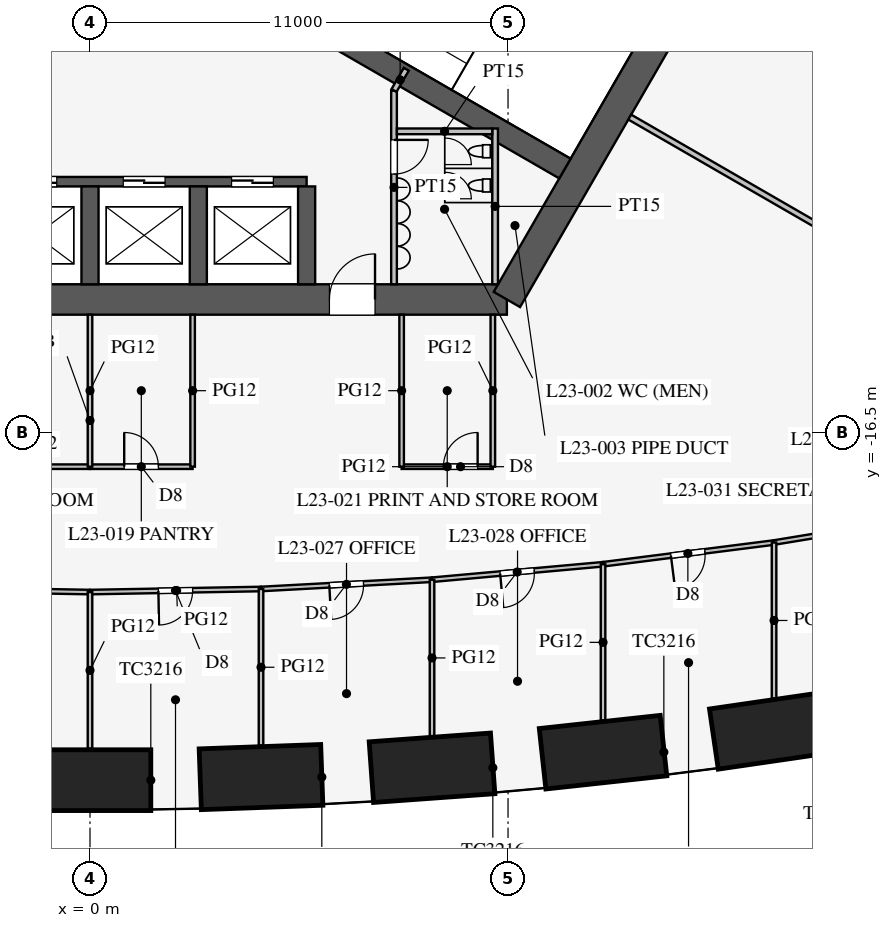
"""IFC4 building model, lengths in metres.
Left out: names, types, materials, properties, quantities, classifications, styles, units other than length and angle.
Written with IfcOpenShell. Run it as: python <this file> out.ifc"""

import sys

from ifc_helpers import new_model, si_unit, direction, frame, frame_2d, origin, origin_2d, place, context, subcontext, project, spatial, rectangle, extrude, element, fill, save


model = new_model("IFC4")
c1 = context("Model", 3, precision=1e-05, world=origin(), true_north=direction((0.0, 1.0)))
c2 = subcontext(c1, "Body", "Model", "MODEL_VIEW")
j1 = project(units=[si_unit("LENGTHUNIT", "METRE"), si_unit("PLANEANGLEUNIT", "RADIAN")], contexts=[c1])
p1 = place(None, origin())
s1 = spatial("IfcSite", under=j1, at=p1, CompositionType="ELEMENT")
p2 = place(p1, origin())
s2 = spatial("IfcBuilding", under=s1, at=p2, CompositionType="ELEMENT")
p3 = place(p2, frame((0.0, 0.0, 103.1)))
s3 = spatial("IfcBuildingStorey", under=s2, at=p3, CompositionType="ELEMENT", Elevation=103.1)
for number, where, z_axis, x_axis in (
    (1, (0.0, -25.65, 0.0), (0.0, 0.0, 1.0), (1.0, 0.0, 0.0)),
    (2, (4.5, -25.568, 0.0), (0.0, 0.0, 1.0), (0.999, 0.036, 0.0)),
    (3, (9.0, -25.323, 0.0), (0.0, 0.0, 1.0), (0.997, 0.072, 0.0)),
    (4, (13.5, -24.913, 0.0), (0.0, 0.0, 1.0), (0.994, 0.108, 0.0)),
    (5, (18.0, -24.337, 0.0), (0.0, 0.0, 1.0), (0.99, 0.144, 0.0)),
):
    element("IfcColumn", number, at=place(p3, frame(where, z_axis=z_axis, x_axis=x_axis)), inside=s3, PredefinedType="COLUMN", context=c2, shape_type="SweptSolid", body=[
        extrude(rectangle(XDim=3.2, YDim=1.6, at=origin_2d()), origin(), (0.0, 0.0, 1.0), 4.2),
    ])
p4 = place(p3, frame((-10.97, -13.0, 0.0), z_axis=(0.0, 0.0, 1.0), x_axis=(1.0, 0.0, 0.0)))
e6 = element("IfcWall", 6, at=p4, inside=s3, PredefinedType="SHEAR", context=c2, shape_type="SweptSolid", body=[
    extrude(rectangle(XDim=21.939, YDim=0.8, at=frame_2d((10.97, 0.0))), origin(), (0.0, 0.0, 1.0), 4.2),
])
p5 = place(p4, frame((17.27, 0.0, 0.0)))
e7 = element("IfcOpeningElement", 7, at=p5, cuts=e6, PredefinedType="OPENING", context=c2, shape_type="SweptSolid", body=[
    extrude(rectangle(XDim=1.2, YDim=2.1, at=frame_2d((0.6, 1.05))), frame((0.0, 0.41, 0.0), z_axis=(0.0, -1.0, 0.0), x_axis=(1.0, 0.0, 0.0)), (0.0, 0.0, 1.0), 0.82),
])
p6 = place(p4, frame((3.47, 0.0, 0.0)))
e8 = element("IfcOpeningElement", 8, at=p6, cuts=e6, PredefinedType="OPENING", context=c2, shape_type="SweptSolid", body=[
    extrude(rectangle(XDim=1.2, YDim=2.1, at=frame_2d((0.6, 1.05))), frame((0.0, 0.41, 0.0), z_axis=(0.0, -1.0, 0.0), x_axis=(1.0, 0.0, 0.0)), (0.0, 0.0, 1.0), 0.82),
])
p7 = place(p3, frame((10.97, -13.0, 0.0), z_axis=(0.0, 0.0, 1.0), x_axis=(0.499995765644, 0.866027848477, 0.0)))
e9 = element("IfcWall", 9, at=p7, inside=s3, PredefinedType="SHEAR", context=c2, shape_type="SweptSolid", body=[
    extrude(rectangle(XDim=11.547, YDim=0.8, at=frame_2d((5.773, 0.0))), origin(), (0.0, 0.0, 1.0), 4.2),
])
p8 = place(p3, frame((-5.7, -9.9, 0.0), z_axis=(0.0, 0.0, 1.0), x_axis=(1.0, 0.0, 0.0)))
e10 = element("IfcWall", 10, at=p8, inside=s3, PredefinedType="SHEAR", context=c2, shape_type="SweptSolid", body=[
    extrude(rectangle(XDim=11.4, YDim=0.25, at=frame_2d((5.7, 0.0))), origin(), (0.0, 0.0, 1.0), 4.2),
])
p9 = place(p8, frame((0.875, 0.0, 0.0)))
e11 = element("IfcOpeningElement", 11, at=p9, cuts=e10, PredefinedType="OPENING", context=c2, shape_type="SweptSolid", body=[
    extrude(rectangle(XDim=1.1, YDim=2.2, at=frame_2d((0.55, 1.1))), frame((0.0, 0.135, 0.0), z_axis=(0.0, -1.0, 0.0), x_axis=(1.0, 0.0, 0.0)), (0.0, 0.0, 1.0), 0.27),
])
p10 = place(p8, frame((3.725, 0.0, 0.0)))
e12 = element("IfcOpeningElement", 12, at=p10, cuts=e10, PredefinedType="OPENING", context=c2, shape_type="SweptSolid", body=[
    extrude(rectangle(XDim=1.1, YDim=2.2, at=frame_2d((0.55, 1.1))), frame((0.0, 0.135, 0.0), z_axis=(0.0, -1.0, 0.0), x_axis=(1.0, 0.0, 0.0)), (0.0, 0.0, 1.0), 0.27),
])
p11 = place(p8, frame((6.575, 0.0, 0.0)))
e13 = element("IfcOpeningElement", 13, at=p11, cuts=e10, PredefinedType="OPENING", context=c2, shape_type="SweptSolid", body=[
    extrude(rectangle(XDim=1.1, YDim=2.2, at=frame_2d((0.55, 1.1))), frame((0.0, 0.135, 0.0), z_axis=(0.0, -1.0, 0.0), x_axis=(1.0, 0.0, 0.0)), (0.0, 0.0, 1.0), 0.27),
])
p12 = place(p8, frame((9.425, 0.0, 0.0)))
e14 = element("IfcOpeningElement", 14, at=p12, cuts=e10, PredefinedType="OPENING", context=c2, shape_type="SweptSolid", body=[
    extrude(rectangle(XDim=1.1, YDim=2.2, at=frame_2d((0.55, 1.1))), frame((0.0, 0.135, 0.0), z_axis=(0.0, -1.0, 0.0), x_axis=(1.0, 0.0, 0.0)), (0.0, 0.0, 1.0), 0.27),
])
for number, where, z_axis, x_axis in (
    (15, (0.0, -10.025, 0.0), (0.0, 0.0, 1.0), (0.0, -1.0, 0.0)),
    (16, (2.85, -10.025, 0.0), (0.0, 0.0, 1.0), (0.0, -1.0, 0.0)),
    (17, (5.7, -10.025, 0.0), (0.0, 0.0, 1.0), (0.0, -1.0, 0.0)),
):
    element("IfcWall", number, at=place(p3, frame(where, z_axis=z_axis, x_axis=x_axis)), inside=s3, PredefinedType="SHEAR", context=c2, shape_type="SweptSolid", body=[
        extrude(rectangle(XDim=2.575, YDim=0.45, at=frame_2d((1.288, 0.0))), origin(), (0.0, 0.0, 1.0), 4.2),
    ])
p13 = place(p3, frame((4.638, -5.016, 0.0), z_axis=(0.0, 0.0, 1.0), x_axis=(0.866019375473, -0.500010441196, 0.0)))
e18 = element("IfcWall", 18, at=p13, inside=s3, PredefinedType="SHEAR", context=c2, shape_type="SweptSolid", body=[
    extrude(rectangle(XDim=9.075, YDim=0.6, at=frame_2d((4.538, 0.0))), origin(), (0.0, 0.0, 1.0), 4.2),
])
p14 = place(p3, frame((8.0, -7.5, 0.0), z_axis=(0.0, 0.0, 1.0), x_axis=(0.0, -1.0, 0.0)))
e19 = element("IfcWall", 19, at=p14, inside=s3, PredefinedType="PARTITIONING", context=c2, shape_type="SweptSolid", body=[
    extrude(rectangle(XDim=5.1, YDim=0.15, at=frame_2d((2.55, 0.0))), origin(), (0.0, 0.0, 1.0), 4.0),
])
p15 = place(p14, frame((1.3, 0.0, 0.0)))
e20 = element("IfcOpeningElement", 20, at=p15, cuts=e19, PredefinedType="OPENING", context=c2, shape_type="SweptSolid", body=[
    extrude(rectangle(XDim=0.9, YDim=2.1, at=frame_2d((0.45, 1.05))), frame((0.0, 0.085, 0.0), z_axis=(0.0, -1.0, 0.0), x_axis=(1.0, 0.0, 0.0)), (0.0, 0.0, 1.0), 0.17),
])
p16 = place(p3, frame((8.0, -7.5, 0.0), z_axis=(0.0, 0.0, 1.0), x_axis=(0.499842556608, 0.866116284689, 0.0)))
e21 = element("IfcWall", 21, at=p16, inside=s3, PredefinedType="PARTITIONING", context=c2, shape_type="SweptSolid", body=[
    extrude(rectangle(XDim=0.645, YDim=0.15, at=frame_2d((0.323, 0.0))), origin(), (0.0, 0.0, 1.0), 4.0),
])
p17 = place(p3, frame((10.66, -8.5, 0.0), z_axis=(0.0, 0.0, 1.0), x_axis=(0.0, -1.0, 0.0)))
e22 = element("IfcWall", 22, at=p17, inside=s3, PredefinedType="PARTITIONING", context=c2, shape_type="SweptSolid", body=[
    extrude(rectangle(XDim=4.1, YDim=0.15, at=frame_2d((2.05, 0.0))), origin(), (0.0, 0.0, 1.0), 4.0),
])
p18 = place(p3, frame((8.075, -8.575, 0.0), z_axis=(0.0, 0.0, 1.0), x_axis=(1.0, 0.0, 0.0)))
e23 = element("IfcWall", 23, at=p18, inside=s3, PredefinedType="PARTITIONING", context=c2, shape_type="SweptSolid", body=[
    extrude(rectangle(XDim=2.51, YDim=0.15, at=frame_2d((1.255, 0.0))), origin(), (0.0, 0.0, 1.0), 4.0),
])
p19 = place(p3, frame((14.203, -8.2, 0.0), z_axis=(0.0, 0.0, 1.0), x_axis=(0.866024668836, -0.500001272966, 0.0)))
e24 = element("IfcWall", 24, at=p19, inside=s3, PredefinedType="PARTITIONING", context=c2, shape_type="SweptSolid", body=[
    extrude(rectangle(XDim=16.65, YDim=0.15, at=frame_2d((8.325, 0.0))), origin(), (0.0, 0.0, 1.0), 2.3),
])
p20 = place(p3, frame((8.2, -17.4, 0.0), z_axis=(0.0, 0.0, 1.0), x_axis=(1.0, 0.0, 0.0)))
e25 = element("IfcWall", 25, at=p20, inside=s3, PredefinedType="PARTITIONING", context=c2, shape_type="SweptSolid", body=[
    extrude(rectangle(XDim=2.4, YDim=0.12, at=frame_2d((1.2, 0.0))), origin(), (0.0, 0.0, 1.0), 2.9),
])
p21 = place(p20, frame((1.1, 0.0, 0.15)))
e26 = element("IfcOpeningElement", 26, at=p21, cuts=e25, PredefinedType="OPENING", context=c2, shape_type="SweptSolid", body=[
    extrude(rectangle(XDim=0.9, YDim=2.1, at=frame_2d((0.45, 1.05))), frame((0.0, 0.07, 0.0), z_axis=(0.0, -1.0, 0.0), x_axis=(1.0, 0.0, 0.0)), (0.0, 0.0, 1.0), 0.14),
])
p22 = place(p3, frame((0.0, -17.4, 0.0), z_axis=(0.0, 0.0, 1.0), x_axis=(1.0, 0.0, 0.0)))
e27 = element("IfcWall", 27, at=p22, inside=s3, PredefinedType="PARTITIONING", context=c2, shape_type="SweptSolid", body=[
    extrude(rectangle(XDim=2.7, YDim=0.12, at=frame_2d((1.35, 0.0))), origin(), (0.0, 0.0, 1.0), 2.9),
])
p23 = place(p22, frame((0.9, 0.0, 0.15)))
e28 = element("IfcOpeningElement", 28, at=p23, cuts=e27, PredefinedType="OPENING", context=c2, shape_type="SweptSolid", body=[
    extrude(rectangle(XDim=0.9, YDim=2.1, at=frame_2d((0.45, 1.05))), frame((0.0, 0.07, 0.0), z_axis=(0.0, -1.0, 0.0), x_axis=(1.0, 0.0, 0.0)), (0.0, 0.0, 1.0), 0.14),
])
p24 = place(p3, frame((-5.6, -17.4, 0.0), z_axis=(0.0, 0.0, 1.0), x_axis=(1.0, 0.0, 0.0)))
e29 = element("IfcWall", 29, at=p24, inside=s3, PredefinedType="PARTITIONING", context=c2, shape_type="SweptSolid", body=[
    extrude(rectangle(XDim=5.6, YDim=0.12, at=frame_2d((2.8, 0.0))), origin(), (0.0, 0.0, 1.0), 2.9),
])
p25 = place(p24, frame((2.3, 0.0, 0.15)))
e30 = element("IfcOpeningElement", 30, at=p25, cuts=e29, PredefinedType="OPENING", context=c2, shape_type="SweptSolid", body=[
    extrude(rectangle(XDim=1.0, YDim=2.1, at=frame_2d((0.5, 1.05))), frame((0.0, 0.07, 0.0), z_axis=(0.0, -1.0, 0.0), x_axis=(1.0, 0.0, 0.0)), (0.0, 0.0, 1.0), 0.14),
])
for number, where, z_axis, x_axis in (
    (31, (10.6, -13.4, 0.0), (0.0, 0.0, 1.0), (0.0, -1.0, 0.0)),
    (32, (2.7, -13.4, 0.0), (0.0, 0.0, 1.0), (0.0, -1.0, 0.0)),
    (33, (8.2, -13.4, 0.0), (0.0, 0.0, 1.0), (0.0, -1.0, 0.0)),
):
    element("IfcWall", number, at=place(p3, frame(where, z_axis=z_axis, x_axis=x_axis)), inside=s3, PredefinedType="PARTITIONING", context=c2, shape_type="SweptSolid", body=[
        extrude(rectangle(XDim=4.0, YDim=0.12, at=frame_2d((2.0, 0.0))), origin(), (0.0, 0.0, 1.0), 2.9),
    ])
p26 = place(p3, frame((0.0, -13.4, 0.0), z_axis=(0.0, 0.0, 1.0), x_axis=(0.0, -1.0, 0.0)))
e34 = element("IfcWall", 34, at=p26, inside=s3, PredefinedType="PARTITIONING", context=c2, shape_type="SweptSolid", body=[
    extrude(rectangle(XDim=4.0, YDim=0.12, at=frame_2d((2.0, 0.0))), origin(), (0.0, 0.0, 1.0), 2.4),
])
p27 = place(p3, frame((0.0, -20.7, 0.0), z_axis=(0.0, 0.0, 1.0), x_axis=(0.999837820638, 0.018009231578, 0.0)))
e35 = element("IfcWall", 35, at=p27, inside=s3, PredefinedType="PARTITIONING", context=c2, shape_type="SweptSolid", body=[
    extrude(rectangle(XDim=4.501, YDim=0.12, at=frame_2d((2.25, 0.0))), origin(), (0.0, 0.0, 1.0), 2.9),
])
p28 = place(p27, frame((1.8, 0.0, 0.15)))
e36 = element("IfcOpeningElement", 36, at=p28, cuts=e35, PredefinedType="OPENING", context=c2, shape_type="SweptSolid", body=[
    extrude(rectangle(XDim=0.9, YDim=2.1, at=frame_2d((0.45, 1.05))), frame((0.0, 0.07, 0.0), z_axis=(0.0, -1.0, 0.0), x_axis=(1.0, 0.0, 0.0)), (0.0, 0.0, 1.0), 0.14),
])
p29 = place(p3, frame((13.5, -19.968, 0.0), z_axis=(0.0, 0.0, 1.0), x_axis=(0.992010652594, 0.12615413247, 0.0)))
e37 = element("IfcWall", 37, at=p29, inside=s3, PredefinedType="PARTITIONING", context=c2, shape_type="SweptSolid", body=[
    extrude(rectangle(XDim=4.536, YDim=0.12, at=frame_2d((2.268, 0.0))), origin(), (0.0, 0.0, 1.0), 2.9),
])
p30 = place(p29, frame((1.8, 0.0, 0.15)))
e38 = element("IfcOpeningElement", 38, at=p30, cuts=e37, PredefinedType="OPENING", context=c2, shape_type="SweptSolid", body=[
    extrude(rectangle(XDim=0.9, YDim=2.1, at=frame_2d((0.45, 1.05))), frame((0.0, 0.07, 0.0), z_axis=(0.0, -1.0, 0.0), x_axis=(1.0, 0.0, 0.0)), (0.0, 0.0, 1.0), 0.14),
])
p31 = place(p3, frame((18.0, -19.396, 0.0), z_axis=(0.0, 0.0, 1.0), x_axis=(0.986764681833, 0.162158757664, 0.0)))
e39 = element("IfcWall", 39, at=p31, inside=s3, PredefinedType="PARTITIONING", context=c2, shape_type="SweptSolid", body=[
    extrude(rectangle(XDim=4.56, YDim=0.12, at=frame_2d((2.28, 0.0))), origin(), (0.0, 0.0, 1.0), 2.9),
])
p32 = place(p31, frame((1.85, 0.0, 0.15)))
e40 = element("IfcOpeningElement", 40, at=p32, cuts=e39, PredefinedType="OPENING", context=c2, shape_type="SweptSolid", body=[
    extrude(rectangle(XDim=0.9, YDim=2.1, at=frame_2d((0.45, 1.05))), frame((0.0, 0.07, 0.0), z_axis=(0.0, -1.0, 0.0), x_axis=(1.0, 0.0, 0.0)), (0.0, 0.0, 1.0), 0.14),
])
p33 = place(p3, frame((4.5, -20.619, 0.0), z_axis=(0.0, 0.0, 1.0), x_axis=(0.998537376538, 0.054065771581, 0.0)))
e41 = element("IfcWall", 41, at=p33, inside=s3, PredefinedType="PARTITIONING", context=c2, shape_type="SweptSolid", body=[
    extrude(rectangle(XDim=4.507, YDim=0.12, at=frame_2d((2.253, 0.0))), origin(), (0.0, 0.0, 1.0), 2.9),
])
p34 = place(p33, frame((1.8, 0.0, 0.15)))
e42 = element("IfcOpeningElement", 42, at=p34, cuts=e41, PredefinedType="OPENING", context=c2, shape_type="SweptSolid", body=[
    extrude(rectangle(XDim=0.9, YDim=2.1, at=frame_2d((0.45, 1.05))), frame((0.0, 0.07, 0.0), z_axis=(0.0, -1.0, 0.0), x_axis=(1.0, 0.0, 0.0)), (0.0, 0.0, 1.0), 0.14),
])
p35 = place(p3, frame((9.0, -20.375, 0.0), z_axis=(0.0, 0.0, 1.0), x_axis=(0.995930325215, 0.090126507295, 0.0)))
e43 = element("IfcWall", 43, at=p35, inside=s3, PredefinedType="PARTITIONING", context=c2, shape_type="SweptSolid", body=[
    extrude(rectangle(XDim=4.518, YDim=0.12, at=frame_2d((2.259, 0.0))), origin(), (0.0, 0.0, 1.0), 2.9),
])
p36 = place(p35, frame((1.8, 0.0, 0.15)))
e44 = element("IfcOpeningElement", 44, at=p36, cuts=e43, PredefinedType="OPENING", context=c2, shape_type="SweptSolid", body=[
    extrude(rectangle(XDim=0.9, YDim=2.1, at=frame_2d((0.45, 1.05))), frame((0.0, 0.07, 0.0), z_axis=(0.0, -1.0, 0.0), x_axis=(1.0, 0.0, 0.0)), (0.0, 0.0, 1.0), 0.14),
])
p37 = place(p3, frame((-4.5, -20.619, 0.0), z_axis=(0.0, 0.0, 1.0), x_axis=(0.999837820638, -0.018009231578, 0.0)))
e45 = element("IfcWall", 45, at=p37, inside=s3, PredefinedType="PARTITIONING", context=c2, shape_type="SweptSolid", body=[
    extrude(rectangle(XDim=4.501, YDim=0.12, at=frame_2d((2.25, 0.0))), origin(), (0.0, 0.0, 1.0), 2.9),
])
p38 = place(p37, frame((1.8, 0.0, 0.15)))
e46 = element("IfcOpeningElement", 46, at=p38, cuts=e45, PredefinedType="OPENING", context=c2, shape_type="SweptSolid", body=[
    extrude(rectangle(XDim=0.9, YDim=2.1, at=frame_2d((0.45, 1.05))), frame((0.0, 0.07, 0.0), z_axis=(0.0, -1.0, 0.0), x_axis=(1.0, 0.0, 0.0)), (0.0, 0.0, 1.0), 0.14),
])
p39 = place(p3, frame((0.0, -20.7, 0.0), z_axis=(0.0, 0.0, 1.0), x_axis=(0.0, -1.0, 0.0)))
e47 = element("IfcWall", 47, at=p39, inside=s3, PredefinedType="PARTITIONING", context=c2, shape_type="SweptSolid", body=[
    extrude(rectangle(XDim=4.12, YDim=0.12, at=frame_2d((2.06, 0.0))), origin(), (0.0, 0.0, 1.0), 2.4),
])
p40 = place(p3, frame((13.5, -19.968, 0.0), z_axis=(0.0, 0.0, 1.0), x_axis=(0.0, -1.0, 0.0)))
e48 = element("IfcWall", 48, at=p40, inside=s3, PredefinedType="PARTITIONING", context=c2, shape_type="SweptSolid", body=[
    extrude(rectangle(XDim=4.11, YDim=0.12, at=frame_2d((2.055, 0.0))), origin(), (0.0, 0.0, 1.0), 2.2),
])
p41 = place(p3, frame((18.0, -19.396, 0.0), z_axis=(0.0, 0.0, 1.0), x_axis=(0.0, -1.0, 0.0)))
e49 = element("IfcWall", 49, at=p41, inside=s3, PredefinedType="PARTITIONING", context=c2, shape_type="SweptSolid", body=[
    extrude(rectangle(XDim=4.103, YDim=0.12, at=frame_2d((2.052, 0.0))), origin(), (0.0, 0.0, 1.0), 2.4),
])
p42 = place(p3, frame((4.5, -20.619, 0.0), z_axis=(0.0, 0.0, 1.0), x_axis=(0.0, -1.0, 0.0)))
e50 = element("IfcWall", 50, at=p42, inside=s3, PredefinedType="PARTITIONING", context=c2, shape_type="SweptSolid", body=[
    extrude(rectangle(XDim=4.119, YDim=0.12, at=frame_2d((2.06, 0.0))), origin(), (0.0, 0.0, 1.0), 2.4),
])
p43 = place(p3, frame((9.0, -20.375, 0.0), z_axis=(0.0, 0.0, 1.0), x_axis=(0.0, -1.0, 0.0)))
e51 = element("IfcWall", 51, at=p43, inside=s3, PredefinedType="PARTITIONING", context=c2, shape_type="SweptSolid", body=[
    extrude(rectangle(XDim=4.116, YDim=0.12, at=frame_2d((2.058, 0.0))), origin(), (0.0, 0.0, 1.0), 2.6),
])
p44 = place(p3, frame((-0.016, 30.491, 0.0), z_axis=(0.0, 0.0, 1.0), x_axis=(-0.50000091641, -0.866024874695, 0.0)))
e52 = element("IfcWall", 52, at=p44, inside=s3, PredefinedType="PARTITIONING", context=c2, shape_type="SweptSolid", body=[
    extrude(rectangle(XDim=52.796, YDim=0.12, at=frame_2d((26.398, 0.0))), origin(), (0.0, 0.0, 1.0), 2.9),
])
p45 = place(p44, frame((10.2, 0.0, 0.15)))
e53 = element("IfcOpeningElement", 53, at=p45, cuts=e52, PredefinedType="OPENING", context=c2, shape_type="SweptSolid", body=[
    extrude(rectangle(XDim=1.8, YDim=2.1, at=frame_2d((0.9, 1.05))), frame((0.0, 0.07, 0.0), z_axis=(0.0, -1.0, 0.0), x_axis=(1.0, 0.0, 0.0)), (0.0, 0.0, 1.0), 0.14),
])
p46 = place(p44, frame((40.8, 0.0, 0.15)))
e54 = element("IfcOpeningElement", 54, at=p46, cuts=e52, PredefinedType="OPENING", context=c2, shape_type="SweptSolid", body=[
    extrude(rectangle(XDim=1.8, YDim=2.1, at=frame_2d((0.9, 1.05))), frame((0.0, 0.07, 0.0), z_axis=(0.0, -1.0, 0.0), x_axis=(1.0, 0.0, 0.0)), (0.0, 0.0, 1.0), 0.14),
])
p47 = place(p15, origin())
e55 = element("IfcDoor", 55, at=p47, inside=s3, OperationType="SINGLE_SWING_LEFT", PredefinedType="DOOR", context=c2, shape_type="SweptSolid", body=[
    extrude(rectangle(XDim=0.9, YDim=2.1, at=frame_2d((0.45, 1.05))), frame((0.0, 0.025, 0.0), z_axis=(0.0, -1.0, 0.0), x_axis=(1.0, 0.0, 0.0)), (0.0, 0.0, 1.0), 0.05),
])
fill(e20, e55)
p48 = place(p5, origin())
e56 = element("IfcDoor", 56, at=p48, inside=s3, OperationType="SINGLE_SWING_RIGHT", PredefinedType="DOOR", context=c2, shape_type="SweptSolid", body=[
    extrude(rectangle(XDim=1.2, YDim=2.1, at=frame_2d((0.6, 1.05))), frame((0.0, 0.025, 0.0), z_axis=(0.0, -1.0, 0.0), x_axis=(1.0, 0.0, 0.0)), (0.0, 0.0, 1.0), 0.05),
])
fill(e7, e56)
p49 = place(p23, origin())
e57 = element("IfcDoor", 57, at=p49, inside=s3, OperationType="SINGLE_SWING_LEFT", PredefinedType="DOOR", context=c2, shape_type="SweptSolid", body=[
    extrude(rectangle(XDim=0.9, YDim=2.1, at=frame_2d((0.45, 1.05))), frame((0.0, 0.025, 0.0), z_axis=(0.0, -1.0, 0.0), x_axis=(1.0, 0.0, 0.0)), (0.0, 0.0, 1.0), 0.05),
])
fill(e28, e57)
p50 = place(p21, origin())
e58 = element("IfcDoor", 58, at=p50, inside=s3, OperationType="SINGLE_SWING_RIGHT", PredefinedType="DOOR", context=c2, shape_type="SweptSolid", body=[
    extrude(rectangle(XDim=0.9, YDim=2.1, at=frame_2d((0.45, 1.05))), frame((0.0, 0.025, 0.0), z_axis=(0.0, -1.0, 0.0), x_axis=(1.0, 0.0, 0.0)), (0.0, 0.0, 1.0), 0.05),
])
fill(e26, e58)
p51 = place(p28, frame((0.9, 0.0, 0.0), z_axis=(0.0, 0.0, 1.0), x_axis=(-1.0, 0.0, 0.0)))
e59 = element("IfcDoor", 59, at=p51, inside=s3, OperationType="SINGLE_SWING_RIGHT", PredefinedType="DOOR", context=c2, shape_type="SweptSolid", body=[
    extrude(rectangle(XDim=0.9, YDim=2.1, at=frame_2d((0.45, 1.05))), frame((0.0, 0.025, 0.0), z_axis=(0.0, -1.0, 0.0), x_axis=(1.0, 0.0, 0.0)), (0.0, 0.0, 1.0), 0.05),
])
fill(e36, e59)
p52 = place(p34, frame((0.9, 0.0, 0.0), z_axis=(0.0, 0.0, 1.0), x_axis=(-1.0, 0.0, 0.0)))
e60 = element("IfcDoor", 60, at=p52, inside=s3, OperationType="SINGLE_SWING_RIGHT", PredefinedType="DOOR", context=c2, shape_type="SweptSolid", body=[
    extrude(rectangle(XDim=0.9, YDim=2.1, at=frame_2d((0.45, 1.05))), frame((0.0, 0.025, 0.0), z_axis=(0.0, -1.0, 0.0), x_axis=(1.0, 0.0, 0.0)), (0.0, 0.0, 1.0), 0.05),
])
fill(e42, e60)
p53 = place(p36, frame((0.9, 0.0, 0.0), z_axis=(0.0, 0.0, 1.0), x_axis=(-1.0, 0.0, 0.0)))
e61 = element("IfcDoor", 61, at=p53, inside=s3, OperationType="SINGLE_SWING_RIGHT", PredefinedType="DOOR", context=c2, shape_type="SweptSolid", body=[
    extrude(rectangle(XDim=0.9, YDim=2.1, at=frame_2d((0.45, 1.05))), frame((0.0, 0.025, 0.0), z_axis=(0.0, -1.0, 0.0), x_axis=(1.0, 0.0, 0.0)), (0.0, 0.0, 1.0), 0.05),
])
fill(e44, e61)
p54 = place(p30, frame((0.9, 0.0, 0.0), z_axis=(0.0, 0.0, 1.0), x_axis=(-1.0, 0.0, 0.0)))
e62 = element("IfcDoor", 62, at=p54, inside=s3, OperationType="SINGLE_SWING_RIGHT", PredefinedType="DOOR", context=c2, shape_type="SweptSolid", body=[
    extrude(rectangle(XDim=0.9, YDim=2.1, at=frame_2d((0.45, 1.05))), frame((0.0, 0.025, 0.0), z_axis=(0.0, -1.0, 0.0), x_axis=(1.0, 0.0, 0.0)), (0.0, 0.0, 1.0), 0.05),
])
fill(e38, e62)
p55 = place(p10, origin())
e63 = element("IfcDoor", 63, at=p55, inside=s3, OperationType="DOUBLE_DOOR_SLIDING", PredefinedType="DOOR", context=c2, shape_type="SweptSolid", body=[
    extrude(rectangle(XDim=1.1, YDim=2.2, at=frame_2d((0.55, 1.1))), frame((0.0, 0.025, 0.0), z_axis=(0.0, -1.0, 0.0), x_axis=(1.0, 0.0, 0.0)), (0.0, 0.0, 1.0), 0.05),
])
fill(e12, e63)
p56 = place(p11, origin())
e64 = element("IfcDoor", 64, at=p56, inside=s3, OperationType="DOUBLE_DOOR_SLIDING", PredefinedType="DOOR", context=c2, shape_type="SweptSolid", body=[
    extrude(rectangle(XDim=1.1, YDim=2.2, at=frame_2d((0.55, 1.1))), frame((0.0, 0.025, 0.0), z_axis=(0.0, -1.0, 0.0), x_axis=(1.0, 0.0, 0.0)), (0.0, 0.0, 1.0), 0.05),
])
fill(e13, e64)
p57 = place(p12, origin())
e65 = element("IfcDoor", 65, at=p57, inside=s3, OperationType="DOUBLE_DOOR_SLIDING", PredefinedType="DOOR", context=c2, shape_type="SweptSolid", body=[
    extrude(rectangle(XDim=1.1, YDim=2.2, at=frame_2d((0.55, 1.1))), frame((0.0, 0.025, 0.0), z_axis=(0.0, -1.0, 0.0), x_axis=(1.0, 0.0, 0.0)), (0.0, 0.0, 1.0), 0.05),
])
fill(e14, e65)
save(model, sys.argv[1])
